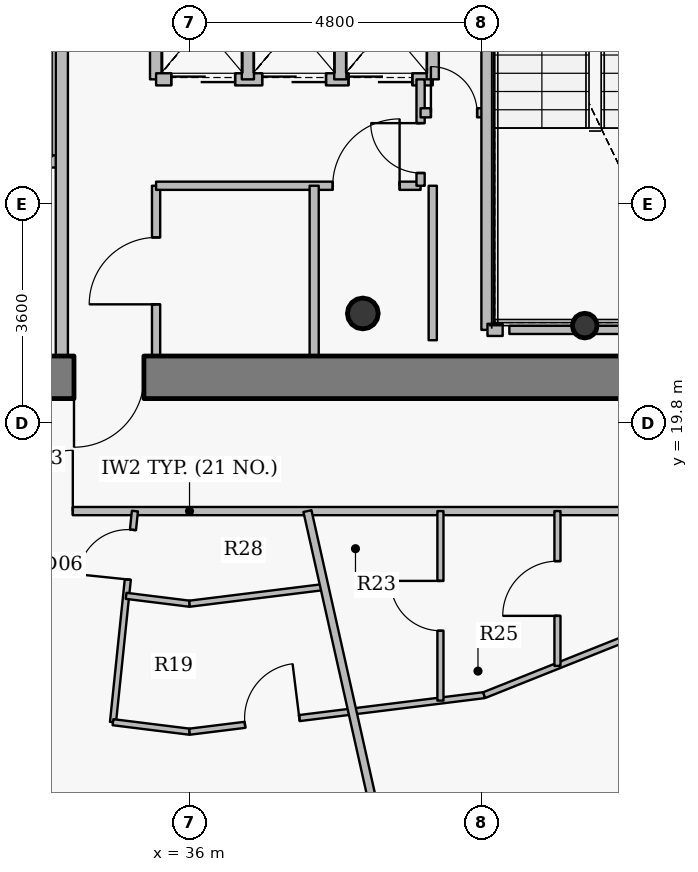
"""IFC4 building model, lengths in metres.
Left out: names, types, materials, properties, quantities, classifications, styles, units other than length and angle.
Written with IfcOpenShell. Run it as: python <this file> out.ifc"""

import sys

from ifc_helpers import new_model, si_unit, direction, frame, frame_2d, origin, origin_2d, place, context, subcontext, project, spatial, rectangle, hollow_circle, extrude, source, transform, mapped, element, fill, save


model = new_model("IFC4")
c1 = context("Model", 3, precision=1e-05, world=origin(), true_north=direction((0.0, 1.0)))
c2 = subcontext(c1, "Body", "Model", "MODEL_VIEW")
j1 = project(units=[si_unit("LENGTHUNIT", "METRE"), si_unit("PLANEANGLEUNIT", "RADIAN")], contexts=[c1])
p1 = place(None, origin())
s1 = spatial("IfcSite", under=j1, at=p1, CompositionType="ELEMENT")
p2 = place(p1, origin())
s2 = spatial("IfcBuilding", under=s1, at=p2, CompositionType="ELEMENT")
p3 = place(p2, frame((0.0, 0.0, 303.0)))
s3 = spatial("IfcBuildingStorey", under=s2, at=p3, CompositionType="ELEMENT", Elevation=303.0)
p4 = place(p3, frame((38.85, 21.6, 0.0), z_axis=(0.0, 0.0, 1.0), x_axis=(1.0, 0.0, 0.0)))
e1 = element("IfcColumn", 1, at=p4, inside=s3, PredefinedType="COLUMN", context=c2, shape_type="SweptSolid", body=[
    extrude(hollow_circle(Radius=0.254, WallThickness=0.02, at=origin_2d()), origin(), (0.0, 0.0, 1.0), 3.75),
])
p5 = place(p3, frame((42.5, 21.4, 0.0), z_axis=(0.0, 0.0, 1.0), x_axis=(1.0, 0.0, 0.0)))
e2 = element("IfcColumn", 2, at=p5, inside=s3, PredefinedType="COLUMN", context=c2, shape_type="SweptSolid", body=[
    extrude(hollow_circle(Radius=0.203, WallThickness=0.016, at=origin_2d()), origin(), (0.0, 0.0, 1.0), 3.75),
])
p6 = place(p3, frame((44.35, 20.55, 0.0), z_axis=(0.0, 0.0, 1.0), x_axis=(-1.0, 0.0, 0.0)))
e3 = element("IfcWall", 3, at=p6, inside=s3, PredefinedType="SHEAR", context=c2, shape_type="SweptSolid", body=[
    extrude(rectangle(XDim=16.7, YDim=0.7, at=frame_2d((8.35, 0.0))), origin(), (0.0, 0.0, 1.0), 3.05),
])
p7 = place(p6, frame((12.925, 0.0, 0.0)))
e4 = element("IfcOpeningElement", 4, at=p7, cuts=e3, PredefinedType="OPENING", context=c2, shape_type="SweptSolid", body=[
    extrude(rectangle(XDim=1.15, YDim=2.15, at=origin_2d()), frame((0.575, 0.36, 1.075), z_axis=(0.0, -1.0, 0.0), x_axis=(1.0, 0.0, 0.0)), (0.0, 0.0, 1.0), 0.72),
])
p8 = place(p6, frame((9.1, 0.0, 0.0)))
e5 = element("IfcOpeningElement", 5, at=p8, cuts=e3, PredefinedType="OPENING", context=c2, shape_type="SweptSolid", body=[
    extrude(rectangle(XDim=1.15, YDim=2.15, at=origin_2d()), frame((0.575, 0.36, 1.075), z_axis=(0.0, -1.0, 0.0), x_axis=(1.0, 0.0, 0.0)), (0.0, 0.0, 1.0), 0.72),
])
p9 = place(p3, frame((24.95, 18.35, 0.0), z_axis=(0.0, 0.0, 1.0), x_axis=(1.0, 0.0, 0.0)))
e6 = element("IfcWall", 6, at=p9, inside=s3, PredefinedType="PARTITIONING", context=c2, shape_type="SweptSolid", body=[
    extrude(rectangle(XDim=22.1, YDim=0.135, at=frame_2d((11.05, 0.0))), origin(), (0.0, 0.0, 1.0), 3.035),
])
p10 = place(p9, frame((8.131, 0.0, 0.0)))
e7 = element("IfcOpeningElement", 7, at=p10, cuts=e6, PredefinedType="OPENING", context=c2, shape_type="SweptSolid", body=[
    extrude(rectangle(XDim=1.0, YDim=2.15, at=origin_2d()), frame((0.5, 0.078, 1.075), z_axis=(0.0, -1.0, 0.0), x_axis=(1.0, 0.0, 0.0)), (0.0, 0.0, 1.0), 0.155),
])
p11 = place(p9, frame((19.081, 0.0, 0.0)))
e8 = element("IfcOpeningElement", 8, at=p11, cuts=e6, PredefinedType="OPENING", context=c2, shape_type="SweptSolid", body=[
    extrude(rectangle(XDim=1.0, YDim=2.15, at=origin_2d()), frame((0.5, 0.078, 1.075), z_axis=(0.0, -1.0, 0.0), x_axis=(1.0, 0.0, 0.0)), (0.0, 0.0, 1.0), 0.155),
])
p12 = place(p3, frame((32.0, 24.1, 0.0), z_axis=(0.0, 0.0, 1.0), x_axis=(1.0, 0.0, 0.0)))
e9 = element("IfcWall", 9, at=p12, inside=s3, PredefinedType="PARTITIONING", context=c2, shape_type="SweptSolid", body=[
    extrude(rectangle(XDim=1.9, YDim=0.2, at=frame_2d((0.95, 0.0))), origin(), (0.0, 0.0, 1.0), 3.085),
])
p13 = place(p12, frame((0.375, 0.0, 0.0)))
e10 = element("IfcOpeningElement", 10, at=p13, cuts=e9, PredefinedType="OPENING", context=c2, shape_type="SweptSolid", body=[
    extrude(rectangle(XDim=1.15, YDim=2.15, at=origin_2d()), frame((0.575, 0.11, 1.075), z_axis=(0.0, -1.0, 0.0), x_axis=(1.0, 0.0, 0.0)), (0.0, 0.0, 1.0), 0.22),
])
p14 = place(p3, frame((33.9, 20.9, 0.0), z_axis=(0.0, 0.0, 1.0), x_axis=(0.0, 1.0, 0.0)))
e11 = element("IfcWall", 11, at=p14, inside=s3, PredefinedType="PARTITIONING", context=c2, shape_type="SweptSolid", body=[
    extrude(rectangle(XDim=6.65, YDim=0.2, at=frame_2d((3.325, 0.0))), origin(), (0.0, 0.0, 1.0), 3.085),
])
p15 = place(p3, frame((34.741, 14.878, 0.0), z_axis=(0.0, 0.0, 1.0), x_axis=(0.103304807989, 0.994649745713, 0.0)))
e12 = element("IfcWall", 12, at=p15, inside=s3, PredefinedType="PARTITIONING", context=c2, shape_type="SweptSolid", body=[
    extrude(rectangle(XDim=3.49, YDim=0.1, at=frame_2d((1.745, 0.0))), origin(), (0.0, 0.0, 1.0), 3.5),
])
p16 = place(p15, frame((2.36, 0.0, 0.0)))
e13 = element("IfcOpeningElement", 13, at=p16, cuts=e12, PredefinedType="OPENING", context=c2, shape_type="SweptSolid", body=[
    extrude(rectangle(XDim=0.82, YDim=2.1, at=origin_2d()), frame((0.41, 0.06, 1.05), z_axis=(0.0, -1.0, 0.0), x_axis=(1.0, 0.0, 0.0)), (0.0, 0.0, 1.0), 0.12),
])
p17 = place(p3, frame((34.741, 14.878, 0.0), z_axis=(0.0, 0.0, 1.0), x_axis=(0.992384109965, -0.123181891074, 0.0)))
e14 = element("IfcWall", 14, at=p17, inside=s3, PredefinedType="PARTITIONING", context=c2, shape_type="SweptSolid", body=[
    extrude(rectangle(XDim=1.269, YDim=0.1, at=frame_2d((0.634, 0.0))), origin(), (0.0, 0.0, 1.0), 3.035),
])
p18 = place(p3, frame((34.957, 16.956, 0.0), z_axis=(0.0, 0.0, 1.0), x_axis=(0.99242017646, -0.122890981589, 0.0)))
e15 = element("IfcWall", 15, at=p18, inside=s3, PredefinedType="PARTITIONING", context=c2, shape_type="SweptSolid", body=[
    extrude(rectangle(XDim=1.051, YDim=0.1, at=frame_2d((0.525, 0.0))), origin(), (0.0, 0.0, 1.0), 3.035),
])
p19 = place(p3, frame((35.45, 20.9, 0.0), z_axis=(0.0, 0.0, 1.0), x_axis=(0.0, 1.0, 0.0)))
e16 = element("IfcWall", 16, at=p19, inside=s3, PredefinedType="PARTITIONING", context=c2, shape_type="SweptSolid", body=[
    extrude(rectangle(XDim=2.8, YDim=0.135, at=frame_2d((1.4, 0.0))), origin(), (0.0, 0.0, 1.0), 3.085),
])
p20 = place(p19, frame((0.85, 0.0, 0.0)))
e17 = element("IfcOpeningElement", 17, at=p20, cuts=e16, PredefinedType="OPENING", context=c2, shape_type="SweptSolid", body=[
    extrude(rectangle(XDim=1.1, YDim=2.15, at=origin_2d()), frame((0.55, 0.078, 1.075), z_axis=(0.0, -1.0, 0.0), x_axis=(1.0, 0.0, 0.0)), (0.0, 0.0, 1.0), 0.155),
])
p21 = place(p3, frame((35.45, 23.7, 0.0), z_axis=(0.0, 0.0, 1.0), x_axis=(1.0, 0.0, 0.0)))
e18 = element("IfcWall", 18, at=p21, inside=s3, PredefinedType="PARTITIONING", context=c2, shape_type="SweptSolid", body=[
    extrude(rectangle(XDim=4.35, YDim=0.135, at=frame_2d((2.175, 0.0))), origin(), (0.0, 0.0, 1.0), 3.085),
])
p22 = place(p21, frame((2.905, 0.0, 0.0)))
e19 = element("IfcOpeningElement", 19, at=p22, cuts=e18, PredefinedType="OPENING", context=c2, shape_type="SweptSolid", body=[
    extrude(rectangle(XDim=1.1, YDim=2.15, at=origin_2d()), frame((0.55, 0.078, 1.075), z_axis=(0.0, -1.0, 0.0), x_axis=(1.0, 0.0, 0.0)), (0.0, 0.0, 1.0), 0.155),
])
p23 = place(p3, frame((35.45, 25.45, 0.0), z_axis=(0.0, 0.0, 1.0), x_axis=(0.0, 1.0, 0.0)))
e20 = element("IfcWall", 20, at=p23, inside=s3, PredefinedType="PARTITIONING", context=c2, shape_type="SweptSolid", body=[
    extrude(rectangle(XDim=1.8, YDim=0.2, at=frame_2d((0.9, 0.0))), origin(), (0.0, 0.0, 1.0), 3.5),
])
p24 = place(p3, frame((35.45, 25.45, 0.0), z_axis=(0.0, 0.0, 1.0), x_axis=(1.0, 0.0, 0.0)))
e21 = element("IfcWall", 21, at=p24, inside=s3, PredefinedType="PARTITIONING", context=c2, shape_type="SweptSolid", body=[
    extrude(rectangle(XDim=4.55, YDim=0.2, at=frame_2d((2.275, 0.0))), origin(), (0.0, 0.0, 1.0), 3.085),
])
p25 = place(p24, frame((0.25, 0.0, 0.0)))
e22 = element("IfcOpeningElement", 22, at=p25, cuts=e21, PredefinedType="OPENING", context=c2, shape_type="SweptSolid", body=[
    extrude(rectangle(XDim=1.05, YDim=2.15, at=origin_2d()), frame((0.525, 0.11, 1.075), z_axis=(0.0, -1.0, 0.0), x_axis=(1.0, 0.0, 0.0)), (0.0, 0.0, 1.0), 0.22),
])
p26 = place(p24, frame((1.745, 0.0, 0.0)))
e23 = element("IfcOpeningElement", 23, at=p26, cuts=e21, PredefinedType="OPENING", context=c2, shape_type="SweptSolid", body=[
    extrude(rectangle(XDim=1.05, YDim=2.15, at=origin_2d()), frame((0.525, 0.11, 1.075), z_axis=(0.0, -1.0, 0.0), x_axis=(1.0, 0.0, 0.0)), (0.0, 0.0, 1.0), 0.22),
])
p27 = place(p24, frame((3.165, 0.0, 0.0)))
e24 = element("IfcOpeningElement", 24, at=p27, cuts=e21, PredefinedType="OPENING", context=c2, shape_type="SweptSolid", body=[
    extrude(rectangle(XDim=1.05, YDim=2.15, at=origin_2d()), frame((0.525, 0.11, 1.075), z_axis=(0.0, -1.0, 0.0), x_axis=(1.0, 0.0, 0.0)), (0.0, 0.0, 1.0), 0.22),
])
p28 = place(p3, frame((36.0, 14.722, 0.0), z_axis=(0.0, 0.0, 1.0), x_axis=(0.99239360053, 0.123105408601, 0.0)))
e25 = element("IfcWall", 25, at=p28, inside=s3, PredefinedType="PARTITIONING", context=c2, shape_type="SweptSolid", body=[
    extrude(rectangle(XDim=4.883, YDim=0.1, at=frame_2d((2.441, 0.0))), origin(), (0.0, 0.0, 1.0), 3.035),
])
p29 = place(p28, frame((0.919, 0.0, 0.0)))
e26 = element("IfcOpeningElement", 26, at=p29, cuts=e25, PredefinedType="OPENING", context=c2, shape_type="SweptSolid", body=[
    extrude(rectangle(XDim=0.9, YDim=2.1, at=origin_2d()), frame((0.45, 0.06, 1.05), z_axis=(0.0, -1.0, 0.0), x_axis=(1.0, 0.0, 0.0)), (0.0, 0.0, 1.0), 0.12),
])
p30 = place(p3, frame((36.0, 16.827, 0.0), z_axis=(0.0, 0.0, 1.0), x_axis=(0.992401670171, 0.123040339085, 0.0)))
e27 = element("IfcWall", 27, at=p30, inside=s3, PredefinedType="PARTITIONING", context=c2, shape_type="SweptSolid", body=[
    extrude(rectangle(XDim=2.236, YDim=0.1, at=frame_2d((1.118, 0.0))), origin(), (0.0, 0.0, 1.0), 3.035),
])
p31 = place(p3, frame((36.96, 25.45, 0.0), z_axis=(0.0, 0.0, 1.0), x_axis=(0.0, 1.0, 0.0)))
e28 = element("IfcWall", 28, at=p31, inside=s3, PredefinedType="PARTITIONING", context=c2, shape_type="SweptSolid", body=[
    extrude(rectangle(XDim=1.8, YDim=0.2, at=frame_2d((0.9, 0.0))), origin(), (0.0, 0.0, 1.0), 3.5),
])
p32 = place(p3, frame((37.939, 18.35, 0.0), z_axis=(0.0, 0.0, 1.0), x_axis=(0.218784248646, -0.975773258777, 0.0)))
e29 = element("IfcWall", 29, at=p32, inside=s3, PredefinedType="PARTITIONING", context=c2, shape_type="SweptSolid", body=[
    extrude(rectangle(XDim=8.699, YDim=0.135, at=frame_2d((4.35, 0.0))), origin(), (0.0, 0.0, 1.0), 2.985),
])
p33 = place(p3, frame((38.05, 20.38, 0.0), z_axis=(0.0, 0.0, 1.0), x_axis=(0.0, 1.0, 0.0)))
e30 = element("IfcWall", 30, at=p33, inside=s3, PredefinedType="PARTITIONING", context=c2, shape_type="SweptSolid", body=[
    extrude(rectangle(XDim=3.32, YDim=0.15, at=frame_2d((1.66, 0.0))), origin(), (0.0, 0.0, 1.0), 3.035),
])
p34 = place(p3, frame((38.48, 25.45, 0.0), z_axis=(0.0, 0.0, 1.0), x_axis=(0.0, 1.0, 0.0)))
e31 = element("IfcWall", 31, at=p34, inside=s3, PredefinedType="PARTITIONING", context=c2, shape_type="SweptSolid", body=[
    extrude(rectangle(XDim=1.8, YDim=0.2, at=frame_2d((0.9, 0.0))), origin(), (0.0, 0.0, 1.0), 3.5),
])
p35 = place(p3, frame((39.8, 23.7, 0.0), z_axis=(0.0, 0.0, 1.0), x_axis=(0.0, 1.0, 0.0)))
e32 = element("IfcWall", 32, at=p35, inside=s3, PredefinedType="PARTITIONING", context=c2, shape_type="SweptSolid", body=[
    extrude(rectangle(XDim=1.75, YDim=0.135, at=frame_2d((0.875, 0.0))), origin(), (0.0, 0.0, 1.0), 3.5),
])
p36 = place(p35, frame((0.21, 0.0, 0.0)))
e33 = element("IfcOpeningElement", 33, at=p36, cuts=e32, PredefinedType="OPENING", context=c2, shape_type="SweptSolid", body=[
    extrude(rectangle(XDim=0.82, YDim=2.1, at=origin_2d()), frame((0.41, 0.078, 1.05), z_axis=(0.0, -1.0, 0.0), x_axis=(1.0, 0.0, 0.0)), (0.0, 0.0, 1.0), 0.155),
])
p37 = place(p3, frame((39.8, 24.9, 0.0), z_axis=(0.0, 0.0, 1.0), x_axis=(1.0, 0.0, 0.0)))
e34 = element("IfcWall", 34, at=p37, inside=s3, PredefinedType="PARTITIONING", context=c2, shape_type="SweptSolid", body=[
    extrude(rectangle(XDim=1.1, YDim=0.15, at=frame_2d((0.55, 0.0))), origin(), (0.0, 0.0, 1.0), 3.5),
])
p38 = place(p37, frame((0.17, 0.0, 0.0)))
e35 = element("IfcOpeningElement", 35, at=p38, cuts=e34, PredefinedType="OPENING", context=c2, shape_type="SweptSolid", body=[
    extrude(rectangle(XDim=0.76, YDim=2.1, at=origin_2d()), frame((0.38, 0.085, 1.05), z_axis=(0.0, -1.0, 0.0), x_axis=(1.0, 0.0, 0.0)), (0.0, 0.0, 1.0), 0.17),
])
p39 = place(p3, frame((40.0, 25.45, 0.0), z_axis=(0.0, 0.0, 1.0), x_axis=(0.0, 1.0, 0.0)))
e36 = element("IfcWall", 36, at=p39, inside=s3, PredefinedType="PARTITIONING", context=c2, shape_type="SweptSolid", body=[
    extrude(rectangle(XDim=4.4, YDim=0.2, at=frame_2d((2.2, 0.0))), origin(), (0.0, 0.0, 1.0), 3.5),
])
p40 = place(p3, frame((40.126, 15.234, 0.0), z_axis=(0.0, 0.0, 1.0), x_axis=(0.0, 1.0, 0.0)))
e37 = element("IfcWall", 37, at=p40, inside=s3, PredefinedType="PARTITIONING", context=c2, shape_type="SweptSolid", body=[
    extrude(rectangle(XDim=3.116, YDim=0.1, at=frame_2d((1.558, 0.0))), origin(), (0.0, 0.0, 1.0), 3.035),
])
p41 = place(p40, frame((1.148, 0.0, 0.0)))
e38 = element("IfcOpeningElement", 38, at=p41, cuts=e37, PredefinedType="OPENING", context=c2, shape_type="SweptSolid", body=[
    extrude(rectangle(XDim=0.82, YDim=2.1, at=origin_2d()), frame((0.41, 0.06, 1.05), z_axis=(0.0, -1.0, 0.0), x_axis=(1.0, 0.0, 0.0)), (0.0, 0.0, 1.0), 0.12),
])
p42 = place(p3, frame((40.845, 15.323, 0.0), z_axis=(0.0, 0.0, 1.0), x_axis=(0.928815810282, 0.370541752804, 0.0)))
e39 = element("IfcWall", 39, at=p42, inside=s3, PredefinedType="PARTITIONING", context=c2, shape_type="SweptSolid", body=[
    extrude(rectangle(XDim=4.414, YDim=0.1, at=frame_2d((2.207, 0.0))), origin(), (0.0, 0.0, 1.0), 3.035),
])
p43 = place(p3, frame((40.9, 21.33, 0.0), z_axis=(0.0, 0.0, 1.0), x_axis=(0.0, 1.0, 0.0)))
e40 = element("IfcWall", 40, at=p43, inside=s3, PredefinedType="PARTITIONING", context=c2, shape_type="SweptSolid", body=[
    extrude(rectangle(XDim=5.91, YDim=0.2, at=frame_2d((2.955, 0.0))), origin(), (0.0, 0.0, 1.0), 3.035),
])
p44 = place(p3, frame((40.9, 21.33, 0.0), z_axis=(0.0, 0.0, 1.0), x_axis=(1.0, 0.0, 0.0)))
e41 = element("IfcWall", 41, at=p44, inside=s3, PredefinedType="PARTITIONING", context=c2, shape_type="SweptSolid", body=[
    extrude(rectangle(XDim=0.25, YDim=0.2, at=frame_2d((0.125, 0.0))), origin(), (0.0, 0.0, 1.0), 3.035),
])
p45 = place(p3, frame((42.051, 15.804, 0.0), z_axis=(0.0, 0.0, 1.0), x_axis=(0.0, 1.0, 0.0)))
e42 = element("IfcWall", 42, at=p45, inside=s3, PredefinedType="PARTITIONING", context=c2, shape_type="SweptSolid", body=[
    extrude(rectangle(XDim=2.546, YDim=0.1, at=frame_2d((1.273, 0.0))), origin(), (0.0, 0.0, 1.0), 3.5),
])
p46 = place(p45, frame((0.823, 0.0, 0.0)))
e43 = element("IfcOpeningElement", 43, at=p46, cuts=e42, PredefinedType="OPENING", context=c2, shape_type="SweptSolid", body=[
    extrude(rectangle(XDim=0.9, YDim=2.1, at=origin_2d()), frame((0.45, 0.06, 1.05), z_axis=(0.0, -1.0, 0.0), x_axis=(1.0, 0.0, 0.0)), (0.0, 0.0, 1.0), 0.12),
])
p47 = place(p3, frame((44.24, 21.33, 0.0), z_axis=(0.0, 0.0, 1.0), x_axis=(-1.0, 0.0, 0.0)))
e44 = element("IfcWall", 44, at=p47, inside=s3, PredefinedType="PARTITIONING", context=c2, shape_type="SweptSolid", body=[
    extrude(rectangle(XDim=2.98, YDim=0.135, at=frame_2d((1.49, 0.0))), origin(), (0.0, 0.0, 1.0), 3.035),
])
p48 = place(p3, frame((40.0, 23.7, 0.0), z_axis=(0.0, 0.0, 1.0), x_axis=(0.0, -1.0, 0.0)))
e45 = element("IfcWall", 45, at=p48, inside=s3, PredefinedType="PARTITIONING", context=c2, shape_type="SweptSolid", body=[
    extrude(rectangle(XDim=2.54, YDim=0.135, at=frame_2d((1.27, 0.0))), origin(), (0.0, 0.0, 1.0), 3.035),
])
m1 = source(origin(), c2, "Body", "SweptSolid", [
    extrude(rectangle(XDim=1.15, YDim=2.15, at=origin_2d()), frame((0.575, 0.025, 1.075), z_axis=(0.0, -1.0, 0.0), x_axis=(1.0, 0.0, 0.0)), (0.0, 0.0, 1.0), 0.05),
])
p49 = place(p8, origin())
e46 = element("IfcDoor", 46, at=p49, inside=s3, OperationType="SINGLE_SWING_RIGHT", PredefinedType="DOOR", context=c2, shape_type="MappedRepresentation", body=[
    mapped(m1, transform((0.0, 0.0, 0.0), x_axis=(1.0, 0.0, 0.0), y_axis=(0.0, 1.0, 0.0), z_axis=(0.0, 0.0, 1.0), scale=1.0)),
])
fill(e5, e46)
m2 = source(origin(), c2, "Body", "SweptSolid", [
    extrude(rectangle(XDim=1.05, YDim=2.15, at=origin_2d()), frame((0.525, 0.025, 1.075), z_axis=(0.0, -1.0, 0.0), x_axis=(1.0, 0.0, 0.0)), (0.0, 0.0, 1.0), 0.05),
])
p50 = place(p25, origin())
e47 = element("IfcDoor", 47, at=p50, inside=s3, OperationType="DOUBLE_DOOR_SLIDING", PredefinedType="USERDEFINED", context=c2, shape_type="MappedRepresentation", body=[
    mapped(m2, transform((0.0, 0.0, 0.0), x_axis=(1.0, 0.0, 0.0), y_axis=(0.0, 1.0, 0.0), z_axis=(0.0, 0.0, 1.0), scale=1.0)),
])
fill(e22, e47)
p51 = place(p26, origin())
e48 = element("IfcDoor", 48, at=p51, inside=s3, OperationType="DOUBLE_DOOR_SLIDING", PredefinedType="USERDEFINED", context=c2, shape_type="MappedRepresentation", body=[
    mapped(m2, transform((0.0, 0.0, 0.0), x_axis=(1.0, 0.0, 0.0), y_axis=(0.0, 1.0, 0.0), z_axis=(0.0, 0.0, 1.0), scale=1.0)),
])
fill(e23, e48)
p52 = place(p27, origin())
e49 = element("IfcDoor", 49, at=p52, inside=s3, OperationType="DOUBLE_DOOR_SLIDING", PredefinedType="USERDEFINED", context=c2, shape_type="MappedRepresentation", body=[
    mapped(m2, transform((0.0, 0.0, 0.0), x_axis=(1.0, 0.0, 0.0), y_axis=(0.0, 1.0, 0.0), z_axis=(0.0, 0.0, 1.0), scale=1.0)),
])
fill(e24, e49)
m3 = source(origin(), c2, "Body", "SweptSolid", [
    extrude(rectangle(XDim=1.0, YDim=2.15, at=origin_2d()), frame((0.5, 0.025, 1.075), z_axis=(0.0, -1.0, 0.0), x_axis=(1.0, 0.0, 0.0)), (0.0, 0.0, 1.0), 0.05),
])
p53 = place(p10, origin())
e50 = element("IfcDoor", 50, at=p53, inside=s3, OperationType="SINGLE_SWING_RIGHT", PredefinedType="DOOR", context=c2, shape_type="MappedRepresentation", body=[
    mapped(m3, transform((0.0, 0.0, 0.0), x_axis=(1.0, 0.0, 0.0), y_axis=(0.0, 1.0, 0.0), z_axis=(0.0, 0.0, 1.0), scale=1.0)),
])
fill(e7, e50)
m4 = source(origin(), c2, "Body", "SweptSolid", [
    extrude(rectangle(XDim=0.82, YDim=2.1, at=origin_2d()), frame((0.41, 0.025, 1.05), z_axis=(0.0, -1.0, 0.0), x_axis=(1.0, 0.0, 0.0)), (0.0, 0.0, 1.0), 0.05),
])
p54 = place(p16, origin())
e51 = element("IfcDoor", 51, at=p54, inside=s3, OperationType="SINGLE_SWING_LEFT", PredefinedType="DOOR", context=c2, shape_type="MappedRepresentation", body=[
    mapped(m4, transform((0.0, 0.0, 0.0), x_axis=(1.0, 0.0, 0.0), y_axis=(0.0, 1.0, 0.0), z_axis=(0.0, 0.0, 1.0), scale=1.0)),
])
fill(e13, e51)
m5 = source(origin(), c2, "Body", "SweptSolid", [
    extrude(rectangle(XDim=0.9, YDim=2.1, at=origin_2d()), frame((0.45, 0.025, 1.05), z_axis=(0.0, -1.0, 0.0), x_axis=(1.0, 0.0, 0.0)), (0.0, 0.0, 1.0), 0.05),
])
p55 = place(p29, origin())
e52 = element("IfcDoor", 52, at=p55, inside=s3, OperationType="SINGLE_SWING_RIGHT", PredefinedType="DOOR", context=c2, shape_type="MappedRepresentation", body=[
    mapped(m5, transform((0.0, 0.0, 0.0), x_axis=(1.0, 0.0, 0.0), y_axis=(0.0, 1.0, 0.0), z_axis=(0.0, 0.0, 1.0), scale=1.0)),
])
fill(e26, e52)
p56 = place(p46, origin())
e53 = element("IfcDoor", 53, at=p56, inside=s3, OperationType="SINGLE_SWING_LEFT", PredefinedType="DOOR", context=c2, shape_type="MappedRepresentation", body=[
    mapped(m5, transform((0.0, 0.0, 0.0), x_axis=(1.0, 0.0, 0.0), y_axis=(0.0, 1.0, 0.0), z_axis=(0.0, 0.0, 1.0), scale=1.0)),
])
fill(e43, e53)
p57 = place(p41, origin())
e54 = element("IfcDoor", 54, at=p57, inside=s3, OperationType="SINGLE_SWING_RIGHT", PredefinedType="DOOR", context=c2, shape_type="MappedRepresentation", body=[
    mapped(m4, transform((0.0, 0.0, 0.0), x_axis=(1.0, 0.0, 0.0), y_axis=(0.0, 1.0, 0.0), z_axis=(0.0, 0.0, 1.0), scale=1.0)),
])
fill(e38, e54)
m6 = source(origin(), c2, "Body", "SweptSolid", [
    extrude(rectangle(XDim=1.1, YDim=2.15, at=origin_2d()), frame((0.55, 0.025, 1.075), z_axis=(0.0, -1.0, 0.0), x_axis=(1.0, 0.0, 0.0)), (0.0, 0.0, 1.0), 0.05),
])
p58 = place(p20, origin())
e55 = element("IfcDoor", 55, at=p58, inside=s3, OperationType="SINGLE_SWING_LEFT", PredefinedType="DOOR", context=c2, shape_type="MappedRepresentation", body=[
    mapped(m6, transform((0.0, 0.0, 0.0), x_axis=(1.0, 0.0, 0.0), y_axis=(0.0, 1.0, 0.0), z_axis=(0.0, 0.0, 1.0), scale=1.0)),
])
fill(e17, e55)
p59 = place(p22, origin())
e56 = element("IfcDoor", 56, at=p59, inside=s3, OperationType="SINGLE_SWING_RIGHT", PredefinedType="DOOR", context=c2, shape_type="MappedRepresentation", body=[
    mapped(m6, transform((0.0, 0.0, 0.0), x_axis=(1.0, 0.0, 0.0), y_axis=(0.0, 1.0, 0.0), z_axis=(0.0, 0.0, 1.0), scale=1.0)),
])
fill(e19, e56)
p60 = place(p36, origin())
e57 = element("IfcDoor", 57, at=p60, inside=s3, OperationType="SINGLE_SWING_RIGHT", PredefinedType="DOOR", context=c2, shape_type="MappedRepresentation", body=[
    mapped(m4, transform((0.0, 0.0, 0.0), x_axis=(1.0, 0.0, 0.0), y_axis=(0.0, 1.0, 0.0), z_axis=(0.0, 0.0, 1.0), scale=1.0)),
])
fill(e33, e57)
m7 = source(origin(), c2, "Body", "SweptSolid", [
    extrude(rectangle(XDim=0.76, YDim=2.1, at=origin_2d()), frame((0.38, 0.025, 1.05), z_axis=(0.0, -1.0, 0.0), x_axis=(1.0, 0.0, 0.0)), (0.0, 0.0, 1.0), 0.05),
])
p61 = place(p38, origin())
e58 = element("IfcDoor", 58, at=p61, inside=s3, OperationType="SINGLE_SWING_LEFT", PredefinedType="DOOR", context=c2, shape_type="MappedRepresentation", body=[
    mapped(m7, transform((0.0, 0.0, 0.0), x_axis=(1.0, 0.0, 0.0), y_axis=(0.0, 1.0, 0.0), z_axis=(0.0, 0.0, 1.0), scale=1.0)),
])
fill(e35, e58)
save(model, sys.argv[1])
